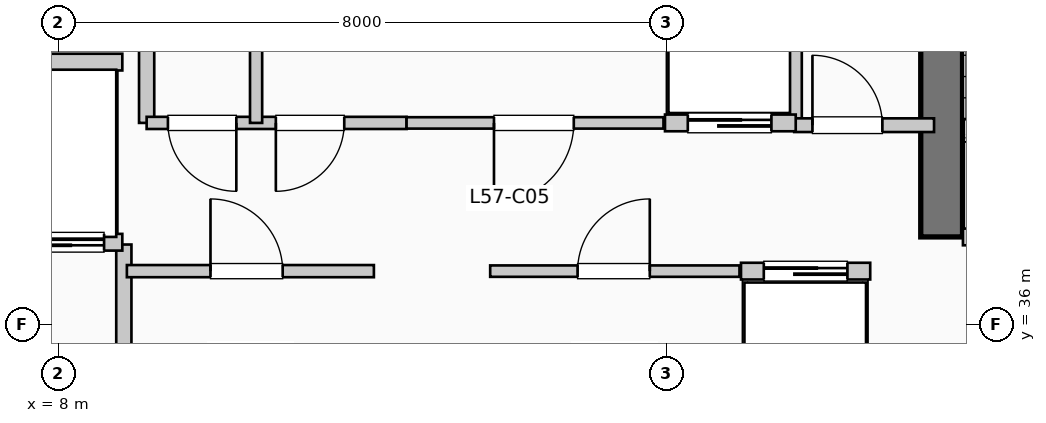
"""IFC4 building model, lengths in metres.
Left out: names, types, materials, properties, quantities, classifications, styles, units other than length and angle.
Written with IfcOpenShell. Run it as: python <this file> out.ifc"""

import sys

from ifc_helpers import new_model, si_unit, direction, frame, frame_2d, origin, place, context, subcontext, project, spatial, rectangle, extrude, element, fill, save


model = new_model("IFC4")
c1 = context("Model", 3, precision=1e-05, world=origin(), true_north=direction((0.0, 1.0)))
c2 = subcontext(c1, "Body", "Model", "MODEL_VIEW")
j1 = project(units=[si_unit("LENGTHUNIT", "METRE"), si_unit("PLANEANGLEUNIT", "RADIAN")], contexts=[c1])
p1 = place(None, origin())
s1 = spatial("IfcSite", under=j1, at=p1, CompositionType="ELEMENT")
p2 = place(p1, origin())
s2 = spatial("IfcBuilding", under=s1, at=p2, CompositionType="ELEMENT")
p3 = place(p2, frame((0.0, 0.0, 235.62)))
s3 = spatial("IfcBuildingStorey", under=s2, at=p3, CompositionType="ELEMENT", Elevation=235.62)
p4 = place(p3, frame((19.62, 37.15, 0.0), z_axis=(0.0, 0.0, 1.0), x_axis=(0.0, 1.0, 0.0)))
e1 = element("IfcWall", 1, at=p4, inside=s3, PredefinedType="SHEAR", context=c2, shape_type="SweptSolid", body=[
    extrude(rectangle(XDim=7.89, YDim=0.55, at=frame_2d((3.945, 0.0))), origin(), (0.0, 0.0, 1.0), 3.96),
])
p5 = place(p3, frame((8.86, 34.55, 0.0), z_axis=(0.0, 0.0, 1.0), x_axis=(0.0, 1.0, 0.0)))
e2 = element("IfcWall", 2, at=p5, inside=s3, PredefinedType="PARTITIONING", context=c2, shape_type="SweptSolid", body=[
    extrude(rectangle(XDim=2.5, YDim=0.2, at=frame_2d((1.25, 0.0))), origin(), (0.0, 0.0, 1.0), 3.71),
])
p6 = place(p3, frame((19.9, 37.15, 0.0), z_axis=(0.0, 0.0, 1.0), x_axis=(1.0, 0.0, 0.0)))
e3 = element("IfcWall", 3, at=p6, inside=s3, PredefinedType="PARTITIONING", context=c2, shape_type="SweptSolid", body=[
    extrude(rectangle(XDim=3.15, YDim=0.22, at=frame_2d((1.575, 0.0))), origin(), (0.0, 0.0, 1.0), 3.71),
])
p7 = place(p6, frame((2.05, 0.0, 0.0), z_axis=(0.0, 0.0, 1.0), x_axis=(-1.0, 0.0, 0.0)))
e4 = element("IfcOpeningElement", 4, at=p7, cuts=e3, PredefinedType="OPENING", context=c2, shape_type="SweptSolid", body=[
    extrude(rectangle(XDim=1.05, YDim=2.15, at=frame_2d((0.525, 1.075))), frame((0.0, 0.12, 0.0), z_axis=(0.0, -1.0, 0.0), x_axis=(1.0, 0.0, 0.0)), (0.0, 0.0, 1.0), 0.24),
])
p8 = place(p3, frame((5.38, 37.08, 0.0), z_axis=(0.0, 0.0, 1.0), x_axis=(1.0, 0.0, 0.0)))
e5 = element("IfcWall", 5, at=p8, inside=s3, PredefinedType="PARTITIONING", context=c2, shape_type="SweptSolid", body=[
    extrude(rectangle(XDim=3.46, YDim=0.22, at=frame_2d((1.73, 0.0))), origin(), (0.0, 0.0, 1.0), 3.71),
])
p9 = place(p8, frame((1.55, 0.0, 0.0), z_axis=(0.0, 0.0, 1.0), x_axis=(-1.0, 0.0, 0.0)))
e6 = element("IfcOpeningElement", 6, at=p9, cuts=e5, PredefinedType="OPENING", context=c2, shape_type="SweptSolid", body=[
    extrude(rectangle(XDim=1.2, YDim=2.2, at=frame_2d((0.6, 1.1))), frame((0.0, 0.12, 0.0), z_axis=(0.0, -1.0, 0.0), x_axis=(1.0, 0.0, 0.0)), (0.0, 0.0, 1.0), 0.24),
])
p10 = place(p8, frame((3.22, 0.0, 0.0), z_axis=(0.0, 0.0, 1.0), x_axis=(-1.0, 0.0, 0.0)))
e7 = element("IfcOpeningElement", 7, at=p10, cuts=e5, PredefinedType="OPENING", context=c2, shape_type="SweptSolid", body=[
    extrude(rectangle(XDim=1.2, YDim=2.2, at=frame_2d((0.6, 1.1))), frame((0.0, 0.12, 0.0), z_axis=(0.0, -1.0, 0.0), x_axis=(1.0, 0.0, 0.0)), (0.0, 0.0, 1.0), 0.24),
])
p11 = place(p3, frame((5.38, 39.45, 0.0), z_axis=(0.0, 0.0, 1.0), x_axis=(1.0, 0.0, 0.0)))
e8 = element("IfcWall", 8, at=p11, inside=s3, PredefinedType="PARTITIONING", context=c2, shape_type="SweptSolid", body=[
    extrude(rectangle(XDim=3.46, YDim=0.22, at=frame_2d((1.73, 0.0))), origin(), (0.0, 0.0, 1.0), 3.71),
])
for number, where, z_axis, x_axis in (
    (9, (9.16, 38.65, 0.0), (0.0, 0.0, 1.0), (0.0, 1.0, 0.0)),
    (10, (17.68, 38.65, 0.0), (0.0, 0.0, 1.0), (0.0, 1.0, 0.0)),
):
    element("IfcWall", number, at=place(p3, frame(where, z_axis=z_axis, x_axis=x_axis)), inside=s3, PredefinedType="PARTITIONING", context=c2, shape_type="SweptSolid", body=[
        extrude(rectangle(XDim=2.35, YDim=0.2, at=frame_2d((1.175, 0.0))), origin(), (0.0, 0.0, 1.0), 3.71),
    ])
p12 = place(p3, frame((17.68, 38.62, 0.0), z_axis=(0.0, 0.0, 1.0), x_axis=(1.0, 0.0, 0.0)))
e11 = element("IfcWall", 11, at=p12, inside=s3, PredefinedType="PARTITIONING", context=c2, shape_type="SweptSolid", body=[
    extrude(rectangle(XDim=1.84, YDim=0.18, at=frame_2d((0.92, 0.0))), origin(), (0.0, 0.0, 1.0), 3.71),
])
p13 = place(p12, frame((0.24, 0.0, 0.0)))
e12 = element("IfcOpeningElement", 12, at=p13, cuts=e11, PredefinedType="OPENING", context=c2, shape_type="SweptSolid", body=[
    extrude(rectangle(XDim=0.92, YDim=2.1, at=frame_2d((0.46, 1.05))), frame((0.0, 0.1, 0.0), z_axis=(0.0, -1.0, 0.0), x_axis=(1.0, 0.0, 0.0)), (0.0, 0.0, 1.0), 0.2),
])
p14 = place(p3, frame((8.9, 36.7, 0.0), z_axis=(0.0, 0.0, 1.0), x_axis=(1.0, 0.0, 0.0)))
e13 = element("IfcWall", 13, at=p14, inside=s3, PredefinedType="PARTITIONING", context=c2, shape_type="SweptSolid", body=[
    extrude(rectangle(XDim=3.25, YDim=0.16, at=frame_2d((1.625, 0.0))), origin(), (0.0, 0.0, 1.0), 3.71),
])
p15 = place(p14, frame((1.1, 0.0, 0.0)))
e14 = element("IfcOpeningElement", 14, at=p15, cuts=e13, PredefinedType="OPENING", context=c2, shape_type="SweptSolid", body=[
    extrude(rectangle(XDim=0.95, YDim=2.15, at=frame_2d((0.475, 1.075))), frame((0.0, 0.09, 0.0), z_axis=(0.0, -1.0, 0.0), x_axis=(1.0, 0.0, 0.0)), (0.0, 0.0, 1.0), 0.18),
])
p16 = place(p3, frame((9.16, 38.65, 0.0), z_axis=(0.0, 0.0, 1.0), x_axis=(1.0, 0.0, 0.0)))
e15 = element("IfcWall", 15, at=p16, inside=s3, PredefinedType="PARTITIONING", context=c2, shape_type="SweptSolid", body=[
    extrude(rectangle(XDim=3.42, YDim=0.16, at=frame_2d((1.71, 0.0))), origin(), (0.0, 0.0, 1.0), 3.71),
])
p17 = place(p16, frame((1.18, 0.0, 0.0), z_axis=(0.0, 0.0, 1.0), x_axis=(-1.0, 0.0, 0.0)))
e16 = element("IfcOpeningElement", 16, at=p17, cuts=e15, PredefinedType="OPENING", context=c2, shape_type="SweptSolid", body=[
    extrude(rectangle(XDim=0.9, YDim=2.15, at=frame_2d((0.45, 1.075))), frame((0.0, 0.09, 0.0), z_axis=(0.0, -1.0, 0.0), x_axis=(1.0, 0.0, 0.0)), (0.0, 0.0, 1.0), 0.18),
])
p18 = place(p16, frame((2.6, 0.0, 0.0), z_axis=(0.0, 0.0, 1.0), x_axis=(-1.0, 0.0, 0.0)))
e17 = element("IfcOpeningElement", 17, at=p18, cuts=e15, PredefinedType="OPENING", context=c2, shape_type="SweptSolid", body=[
    extrude(rectangle(XDim=0.9, YDim=2.15, at=frame_2d((0.45, 1.075))), frame((0.0, 0.09, 0.0), z_axis=(0.0, -1.0, 0.0), x_axis=(1.0, 0.0, 0.0)), (0.0, 0.0, 1.0), 0.18),
])
p19 = place(p3, frame((10.6, 38.65, 0.0), z_axis=(0.0, 0.0, 1.0), x_axis=(0.0, 1.0, 0.0)))
e18 = element("IfcWall", 18, at=p19, inside=s3, PredefinedType="PARTITIONING", context=c2, shape_type="SweptSolid", body=[
    extrude(rectangle(XDim=2.35, YDim=0.16, at=frame_2d((1.175, 0.0))), origin(), (0.0, 0.0, 1.0), 3.71),
])
p20 = place(p3, frame((13.68, 36.7, 0.0), z_axis=(0.0, 0.0, 1.0), x_axis=(1.0, 0.0, 0.0)))
e19 = element("IfcWall", 19, at=p20, inside=s3, PredefinedType="PARTITIONING", context=c2, shape_type="SweptSolid", body=[
    extrude(rectangle(XDim=3.28, YDim=0.15, at=frame_2d((1.64, 0.0))), origin(), (0.0, 0.0, 1.0), 3.71),
])
p21 = place(p20, frame((1.15, 0.0, 0.0)))
e20 = element("IfcOpeningElement", 20, at=p21, cuts=e19, PredefinedType="OPENING", context=c2, shape_type="SweptSolid", body=[
    extrude(rectangle(XDim=0.95, YDim=2.15, at=frame_2d((0.475, 1.075))), frame((0.0, 0.085, 0.0), z_axis=(0.0, -1.0, 0.0), x_axis=(1.0, 0.0, 0.0)), (0.0, 0.0, 1.0), 0.17),
])
p22 = place(p3, frame((12.58, 38.65, 0.0), z_axis=(0.0, 0.0, 1.0), x_axis=(1.0, 0.0, 0.0)))
e21 = element("IfcWall", 21, at=p22, inside=s3, PredefinedType="PARTITIONING", context=c2, shape_type="SweptSolid", body=[
    extrude(rectangle(XDim=3.38, YDim=0.15, at=frame_2d((1.69, 0.0))), origin(), (0.0, 0.0, 1.0), 3.71),
])
p23 = place(p22, frame((2.2, 0.0, 0.0), z_axis=(0.0, 0.0, 1.0), x_axis=(-1.0, 0.0, 0.0)))
e22 = element("IfcOpeningElement", 22, at=p23, cuts=e21, PredefinedType="OPENING", context=c2, shape_type="SweptSolid", body=[
    extrude(rectangle(XDim=1.05, YDim=2.15, at=frame_2d((0.525, 1.075))), frame((0.0, 0.085, 0.0), z_axis=(0.0, -1.0, 0.0), x_axis=(1.0, 0.0, 0.0)), (0.0, 0.0, 1.0), 0.17),
])
p24 = place(p3, frame((16.98, 36.7, 0.0), z_axis=(0.0, 0.0, 1.0), x_axis=(1.0, 0.0, 0.0)))
e23 = element("IfcWall", 23, at=p24, inside=s3, PredefinedType="PARTITIONING", context=c2, shape_type="SweptSolid", body=[
    extrude(rectangle(XDim=1.7, YDim=0.22, at=frame_2d((0.85, 0.0))), origin(), (0.0, 0.0, 1.0), 3.71),
])
p25 = place(p24, frame((0.3, 0.0, 0.0)))
e24 = element("IfcOpeningElement", 24, at=p25, cuts=e23, PredefinedType="OPENING", context=c2, shape_type="SweptSolid", body=[
    extrude(rectangle(XDim=1.1, YDim=2.2, at=frame_2d((0.55, 1.1))), frame((0.0, 0.12, 0.0), z_axis=(0.0, -1.0, 0.0), x_axis=(1.0, 0.0, 0.0)), (0.0, 0.0, 1.0), 0.24),
])
p26 = place(p3, frame((15.98, 38.65, 0.0), z_axis=(0.0, 0.0, 1.0), x_axis=(1.0, 0.0, 0.0)))
e25 = element("IfcWall", 25, at=p26, inside=s3, PredefinedType="PARTITIONING", context=c2, shape_type="SweptSolid", body=[
    extrude(rectangle(XDim=1.72, YDim=0.22, at=frame_2d((0.86, 0.0))), origin(), (0.0, 0.0, 1.0), 3.71),
])
p27 = place(p26, frame((0.3, 0.0, 0.0)))
e26 = element("IfcOpeningElement", 26, at=p27, cuts=e25, PredefinedType="OPENING", context=c2, shape_type="SweptSolid", body=[
    extrude(rectangle(XDim=1.1, YDim=2.2, at=frame_2d((0.55, 1.1))), frame((0.0, 0.12, 0.0), z_axis=(0.0, -1.0, 0.0), x_axis=(1.0, 0.0, 0.0)), (0.0, 0.0, 1.0), 0.24),
])
p28 = place(p10, origin())
e27 = element("IfcDoor", 27, at=p28, inside=s3, OperationType="SLIDING_TO_RIGHT", PredefinedType="DOOR", context=c2, shape_type="SweptSolid", body=[
    extrude(rectangle(XDim=1.2, YDim=2.2, at=frame_2d((0.6, 1.1))), frame((0.0, 0.025, 0.0), z_axis=(0.0, -1.0, 0.0), x_axis=(1.0, 0.0, 0.0)), (0.0, 0.0, 1.0), 0.05),
])
fill(e7, e27)
p29 = place(p13, origin())
e28 = element("IfcDoor", 28, at=p29, inside=s3, OperationType="SINGLE_SWING_LEFT", PredefinedType="DOOR", context=c2, shape_type="SweptSolid", body=[
    extrude(rectangle(XDim=0.92, YDim=2.1, at=frame_2d((0.46, 1.05))), frame((0.0, 0.025, 0.0), z_axis=(0.0, -1.0, 0.0), x_axis=(1.0, 0.0, 0.0)), (0.0, 0.0, 1.0), 0.05),
])
fill(e12, e28)
p30 = place(p15, origin())
e29 = element("IfcDoor", 29, at=p30, inside=s3, OperationType="SINGLE_SWING_LEFT", PredefinedType="DOOR", context=c2, shape_type="SweptSolid", body=[
    extrude(rectangle(XDim=0.95, YDim=2.15, at=frame_2d((0.475, 1.075))), frame((0.0, 0.025, 0.0), z_axis=(0.0, -1.0, 0.0), x_axis=(1.0, 0.0, 0.0)), (0.0, 0.0, 1.0), 0.05),
])
fill(e14, e29)
p31 = place(p17, origin())
e30 = element("IfcDoor", 30, at=p31, inside=s3, OperationType="SINGLE_SWING_RIGHT", PredefinedType="DOOR", context=c2, shape_type="SweptSolid", body=[
    extrude(rectangle(XDim=0.9, YDim=2.15, at=frame_2d((0.45, 1.075))), frame((0.0, 0.025, 0.0), z_axis=(0.0, -1.0, 0.0), x_axis=(1.0, 0.0, 0.0)), (0.0, 0.0, 1.0), 0.05),
])
fill(e16, e30)
p32 = place(p18, origin())
e31 = element("IfcDoor", 31, at=p32, inside=s3, OperationType="SINGLE_SWING_LEFT", PredefinedType="DOOR", context=c2, shape_type="SweptSolid", body=[
    extrude(rectangle(XDim=0.9, YDim=2.15, at=frame_2d((0.45, 1.075))), frame((0.0, 0.025, 0.0), z_axis=(0.0, -1.0, 0.0), x_axis=(1.0, 0.0, 0.0)), (0.0, 0.0, 1.0), 0.05),
])
fill(e17, e31)
p33 = place(p21, origin())
e32 = element("IfcDoor", 32, at=p33, inside=s3, OperationType="SINGLE_SWING_RIGHT", PredefinedType="DOOR", context=c2, shape_type="SweptSolid", body=[
    extrude(rectangle(XDim=0.95, YDim=2.15, at=frame_2d((0.475, 1.075))), frame((0.0, 0.025, 0.0), z_axis=(0.0, -1.0, 0.0), x_axis=(1.0, 0.0, 0.0)), (0.0, 0.0, 1.0), 0.05),
])
fill(e20, e32)
p34 = place(p23, origin())
e33 = element("IfcDoor", 33, at=p34, inside=s3, OperationType="SINGLE_SWING_LEFT", PredefinedType="DOOR", context=c2, shape_type="SweptSolid", body=[
    extrude(rectangle(XDim=1.05, YDim=2.15, at=frame_2d((0.525, 1.075))), frame((0.0, 0.025, 0.0), z_axis=(0.0, -1.0, 0.0), x_axis=(1.0, 0.0, 0.0)), (0.0, 0.0, 1.0), 0.05),
])
fill(e22, e33)
p35 = place(p25, origin())
e34 = element("IfcDoor", 34, at=p35, inside=s3, OperationType="SLIDING_TO_LEFT", PredefinedType="DOOR", context=c2, shape_type="SweptSolid", body=[
    extrude(rectangle(XDim=1.1, YDim=2.2, at=frame_2d((0.55, 1.1))), frame((0.0, 0.025, 0.0), z_axis=(0.0, -1.0, 0.0), x_axis=(1.0, 0.0, 0.0)), (0.0, 0.0, 1.0), 0.05),
])
fill(e24, e34)
p36 = place(p27, origin())
e35 = element("IfcDoor", 35, at=p36, inside=s3, OperationType="SLIDING_TO_LEFT", PredefinedType="DOOR", context=c2, shape_type="SweptSolid", body=[
    extrude(rectangle(XDim=1.1, YDim=2.2, at=frame_2d((0.55, 1.1))), frame((0.0, 0.025, 0.0), z_axis=(0.0, -1.0, 0.0), x_axis=(1.0, 0.0, 0.0)), (0.0, 0.0, 1.0), 0.05),
])
fill(e26, e35)
save(model, sys.argv[1])
